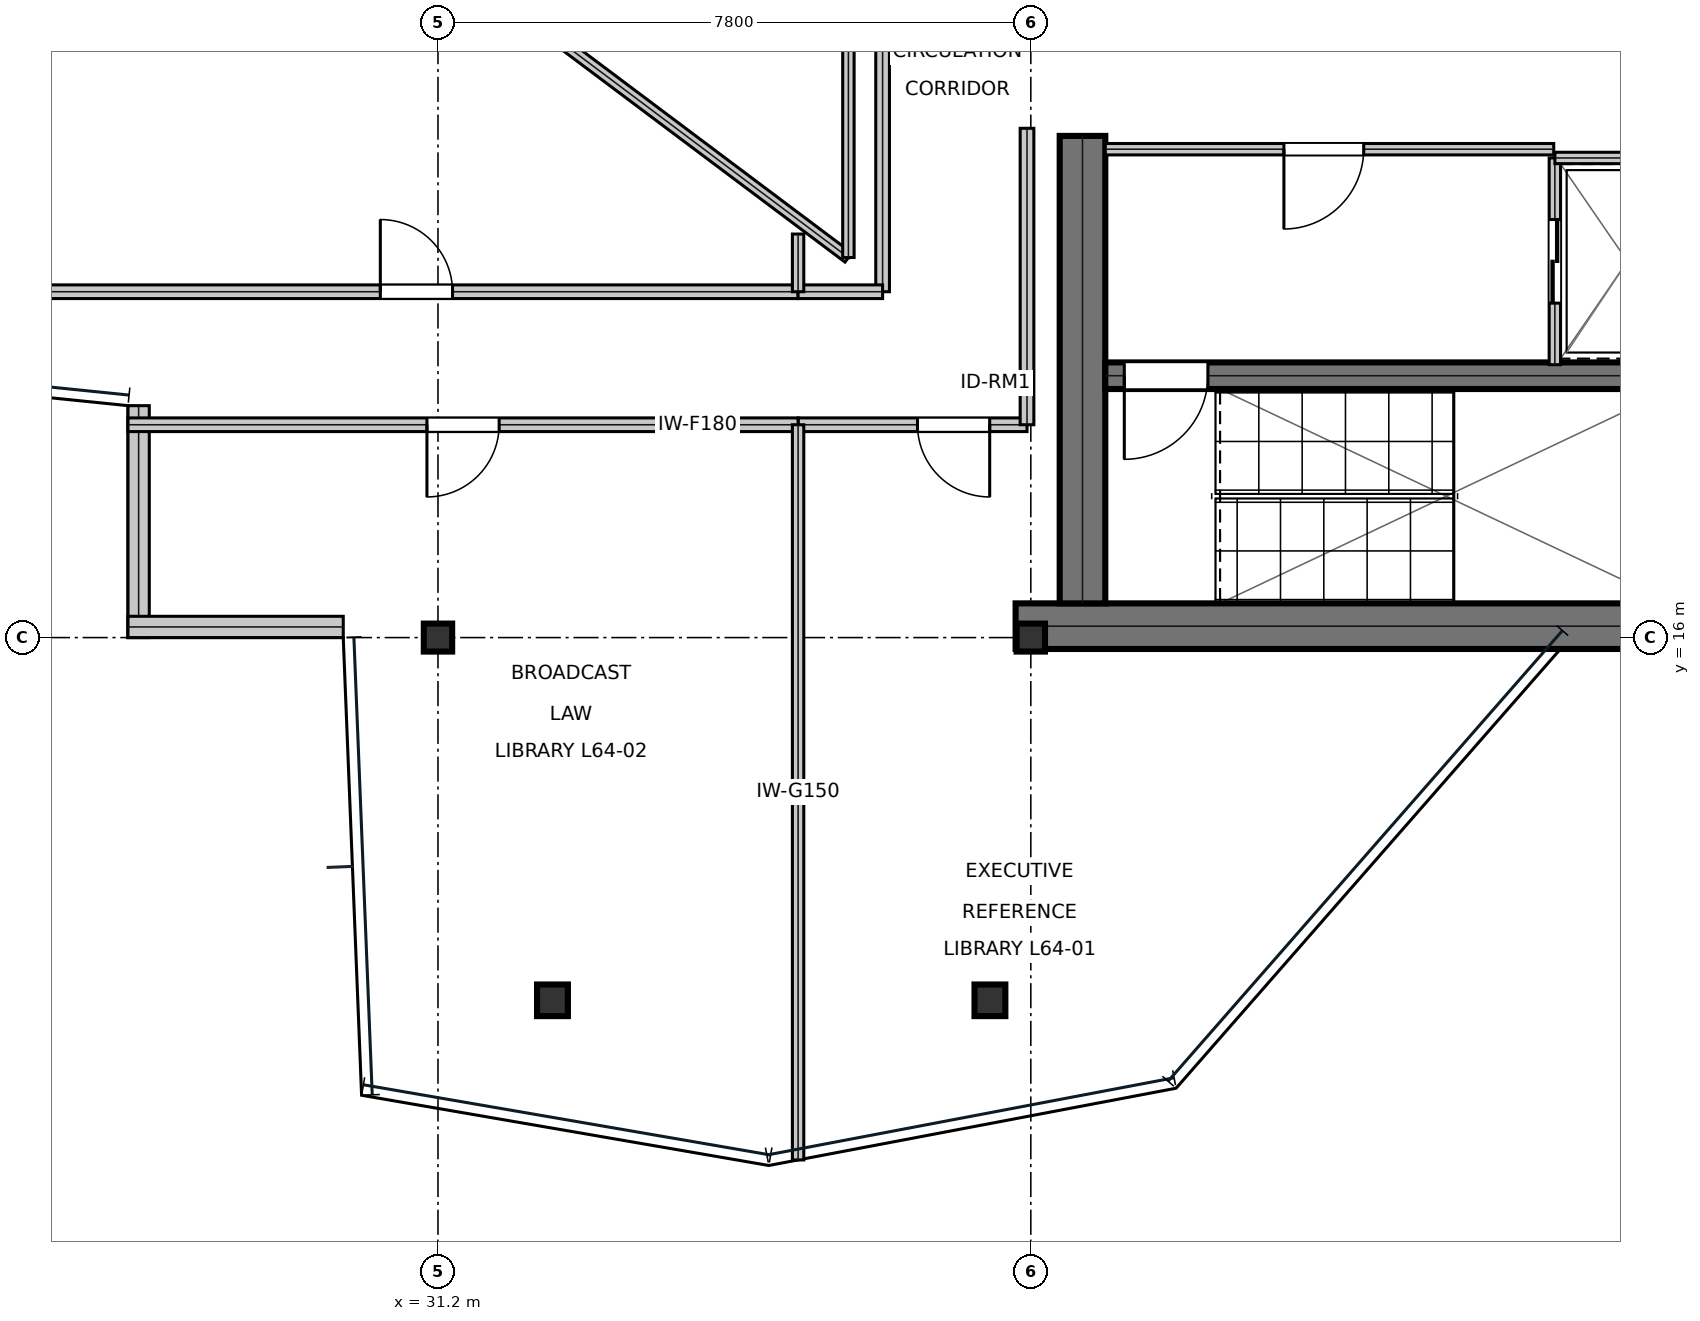
"""IFC4 building model, lengths in metres.
Left out: names, types, materials, properties, quantities, classifications, styles, units other than length and angle.
Written with IfcOpenShell. Run it as: python <this file> out.ifc"""

import sys

from ifc_helpers import new_model, si_unit, direction, frame, frame_2d, origin, origin_2d, place, context, subcontext, project, spatial, rectangle, i_section, extrude, element, fill, save


model = new_model("IFC4")
c1 = context("Model", 3, precision=1e-05, world=origin(), true_north=direction((0.0, 1.0)))
c2 = subcontext(c1, "Body", "Model", "MODEL_VIEW")
j1 = project(units=[si_unit("LENGTHUNIT", "METRE"), si_unit("PLANEANGLEUNIT", "RADIAN")], contexts=[c1])
p1 = place(None, origin())
s1 = spatial("IfcSite", under=j1, at=p1, CompositionType="ELEMENT")
p2 = place(p1, origin())
s2 = spatial("IfcBuilding", under=s1, at=p2, CompositionType="ELEMENT")
p3 = place(p2, frame((0.0, 0.0, 274.95)))
s3 = spatial("IfcBuildingStorey", under=s2, at=p3, CompositionType="ELEMENT", Elevation=274.95)
p4 = place(p3, frame((38.8, 16.15, 0.0), z_axis=(0.0, 0.0, 1.0), x_axis=(1.0, 0.0, 0.0)))
e1 = element("IfcWall", 1, at=p4, inside=s3, PredefinedType="SHEAR", context=c2, shape_type="SweptSolid", body=[
    extrude(rectangle(XDim=16.0, YDim=0.6, at=frame_2d((8.0, 0.0))), origin(), (0.0, 0.0, 1.0), 3.81),
])
p5 = place(p3, frame((39.68, 16.45, 0.0), z_axis=(0.0, 0.0, 1.0), x_axis=(0.0, 1.0, 0.0)))
e2 = element("IfcWall", 2, at=p5, inside=s3, PredefinedType="SHEAR", context=c2, shape_type="SweptSolid", body=[
    extrude(rectangle(XDim=6.15, YDim=0.6, at=frame_2d((3.075, 0.0))), origin(), (0.0, 0.0, 1.0), 3.81),
])
p6 = place(p3, frame((39.98, 19.445, 0.0), z_axis=(0.0, 0.0, 1.0), x_axis=(1.0, 0.0, 0.0)))
e3 = element("IfcWall", 3, at=p6, inside=s3, PredefinedType="SHEAR", context=c2, shape_type="SweptSolid", body=[
    extrude(rectangle(XDim=7.71, YDim=0.35, at=frame_2d((3.855, 0.0))), origin(), (0.0, 0.0, 1.0), 3.81),
])
p7 = place(p6, frame((0.25, 0.0, 0.0)))
e4 = element("IfcOpeningElement", 4, at=p7, cuts=e3, PredefinedType="OPENING", context=c2, shape_type="SweptSolid", body=[
    extrude(rectangle(XDim=1.1, YDim=2.15, at=frame_2d((0.55, 1.075))), frame((0.0, 0.185, 0.0), z_axis=(0.0, -1.0, 0.0), x_axis=(1.0, 0.0, 0.0)), (0.0, 0.0, 1.0), 0.37),
])
for number, where, z_axis, x_axis in (
    (5, (31.2, 16.0, 0.0), (0.0, 0.0, 1.0), (1.0, 0.0, 0.0)),
    (6, (39.0, 16.0, 0.0), (0.0, 0.0, 1.0), (1.0, 0.0, 0.0)),
):
    element("IfcColumn", number, at=place(p3, frame(where, z_axis=z_axis, x_axis=x_axis)), inside=s3, PredefinedType="COLUMN", context=c2, shape_type="SweptSolid", body=[
        extrude(i_section(OverallWidth=0.373, OverallDepth=0.368, WebThickness=0.015, FlangeThickness=0.024, at=origin_2d()), origin(), (0.0, 0.0, 1.0), 4.044),
    ])
p8 = place(p3, frame((32.706, 11.228, 0.016), z_axis=(0.013968236766, 0.029819148922, 0.999457706318), x_axis=(-0.905569653976, 0.424197597586, 0.0)))
e7 = element("IfcColumn", 7, at=p8, inside=s3, PredefinedType="COLUMN", context=c2, shape_type="SweptSolid", body=[
    extrude(i_section(OverallWidth=0.406, OverallDepth=0.416, WebThickness=0.03, FlangeThickness=0.048, at=origin_2d()), origin(), (0.0, 0.0, 1.0), 4.02),
])
p9 = place(p3, frame((38.462, 11.228, 0.016), z_axis=(-0.004980404192, 0.029821688517, 0.99954282673), x_axis=(-0.986339577116, -0.164724735893, 0.0)))
e8 = element("IfcColumn", 8, at=p9, inside=s3, PredefinedType="COLUMN", context=c2, shape_type="SweptSolid", body=[
    extrude(i_section(OverallWidth=0.406, OverallDepth=0.416, WebThickness=0.03, FlangeThickness=0.048, at=origin_2d()), origin(), (0.0, 0.0, 1.0), 4.02),
])
p10 = place(p3, frame((27.262, 19.051, 0.0), z_axis=(0.0, 0.0, 1.0), x_axis=(0.0, -1.0, 0.0)))
e9 = element("IfcWall", 9, at=p10, inside=s3, PredefinedType="STANDARD", context=c2, shape_type="SweptSolid", body=[
    extrude(rectangle(XDim=3.051, YDim=0.28, at=frame_2d((1.526, 0.0))), origin(), (0.0, 0.0, 1.0), 3.339),
])
p11 = place(p3, frame((27.122, 16.14, 0.0), z_axis=(0.0, 0.0, 1.0), x_axis=(1.0, 0.0, 0.0)))
e10 = element("IfcWall", 10, at=p11, inside=s3, PredefinedType="STANDARD", context=c2, shape_type="SweptSolid", body=[
    extrude(rectangle(XDim=2.832, YDim=0.28, at=frame_2d((1.416, 0.0))), origin(), (0.0, 0.0, 1.0), 3.81),
])
p12 = place(p3, frame((39.98, 22.425, 0.0), z_axis=(0.0, 0.0, 1.0), x_axis=(1.0, 0.0, 0.0)))
e11 = element("IfcWall", 11, at=p12, inside=s3, PredefinedType="PARTITIONING", context=c2, shape_type="SweptSolid", body=[
    extrude(rectangle(XDim=5.9, YDim=0.15, at=frame_2d((2.95, 0.0))), origin(), (0.0, 0.0, 1.0), 3.81),
])
p13 = place(p12, frame((2.35, 0.0, 0.0)))
e12 = element("IfcOpeningElement", 12, at=p13, cuts=e11, PredefinedType="OPENING", context=c2, shape_type="SweptSolid", body=[
    extrude(rectangle(XDim=1.05, YDim=2.15, at=frame_2d((0.525, 1.075))), frame((0.0, 0.085, 0.0), z_axis=(0.0, -1.0, 0.0), x_axis=(1.0, 0.0, 0.0)), (0.0, 0.0, 1.0), 0.17),
])
p14 = place(p3, frame((45.895, 19.59, 0.0), z_axis=(0.0, 0.0, 1.0), x_axis=(0.0, 1.0, 0.0)))
e13 = element("IfcWall", 13, at=p14, inside=s3, PredefinedType="PARTITIONING", context=c2, shape_type="SweptSolid", body=[
    extrude(rectangle(XDim=2.72, YDim=0.15, at=frame_2d((1.36, 0.0))), origin(), (0.0, 0.0, 1.0), 3.81),
])
p15 = place(p14, frame((0.81, 0.0, 0.0)))
e14 = element("IfcOpeningElement", 14, at=p15, cuts=e13, PredefinedType="OPENING", context=c2, shape_type="SweptSolid", body=[
    extrude(rectangle(XDim=1.1, YDim=2.15, at=frame_2d((0.55, 1.075))), frame((0.0, 0.085, 0.0), z_axis=(0.0, -1.0, 0.0), x_axis=(1.0, 0.0, 0.0)), (0.0, 0.0, 1.0), 0.17),
])
p16 = place(p3, frame((45.895, 22.31, 0.0), z_axis=(0.0, 0.0, 1.0), x_axis=(1.0, 0.0, 0.0)))
e15 = element("IfcWall", 15, at=p16, inside=s3, PredefinedType="PARTITIONING", context=c2, shape_type="SweptSolid", body=[
    extrude(rectangle(XDim=1.915, YDim=0.15, at=frame_2d((0.958, 0.0))), origin(), (0.0, 0.0, 1.0), 3.81),
])
p17 = place(p3, frame((35.938, 18.8, 0.0), z_axis=(0.0, 0.0, 1.0), x_axis=(1.0, 0.0, 0.0)))
e16 = element("IfcWall", 16, at=p17, inside=s3, PredefinedType="SOLIDWALL", context=c2, shape_type="SweptSolid", body=[
    extrude(rectangle(XDim=3.012, YDim=0.18, at=frame_2d((1.506, 0.0))), origin(), (0.0, 0.0, 1.0), 3.81),
])
p18 = place(p17, frame((1.571, 0.0, 0.0)))
e17 = element("IfcOpeningElement", 17, at=p18, cuts=e16, PredefinedType="OPENING", context=c2, shape_type="SweptSolid", body=[
    extrude(rectangle(XDim=0.95, YDim=2.15, at=frame_2d((0.475, 1.075))), frame((0.0, 0.1, 0.0), z_axis=(0.0, -1.0, 0.0), x_axis=(1.0, 0.0, 0.0)), (0.0, 0.0, 1.0), 0.2),
])
p19 = place(p3, frame((27.122, 18.8, 0.0), z_axis=(0.0, 0.0, 1.0), x_axis=(1.0, 0.0, 0.0)))
e18 = element("IfcWall", 18, at=p19, inside=s3, PredefinedType="SOLIDWALL", context=c2, shape_type="SweptSolid", body=[
    extrude(rectangle(XDim=8.816, YDim=0.18, at=frame_2d((4.408, 0.0))), origin(), (0.0, 0.0, 1.0), 3.27),
])
p20 = place(p19, frame((3.933, 0.0, 0.0)))
e19 = element("IfcOpeningElement", 19, at=p20, cuts=e18, PredefinedType="OPENING", context=c2, shape_type="SweptSolid", body=[
    extrude(rectangle(XDim=0.95, YDim=2.15, at=frame_2d((0.475, 1.075))), frame((0.0, 0.1, 0.0), z_axis=(0.0, -1.0, 0.0), x_axis=(1.0, 0.0, 0.0)), (0.0, 0.0, 1.0), 0.2),
])
p21 = place(p3, frame((25.895, 20.55, 0.0), z_axis=(0.0, 0.0, 1.0), x_axis=(1.0, 0.0, 0.0)))
e20 = element("IfcWall", 20, at=p21, inside=s3, PredefinedType="SOLIDWALL", context=c2, shape_type="SweptSolid", body=[
    extrude(rectangle(XDim=10.043, YDim=0.18, at=frame_2d((5.021, 0.0))), origin(), (0.0, 0.0, 1.0), 3.27),
])
p22 = place(p21, frame((4.546, 0.0, 0.0)))
e21 = element("IfcOpeningElement", 21, at=p22, cuts=e20, PredefinedType="OPENING", context=c2, shape_type="SweptSolid", body=[
    extrude(rectangle(XDim=0.95, YDim=2.15, at=frame_2d((0.475, 1.075))), frame((0.0, 0.1, 0.0), z_axis=(0.0, -1.0, 0.0), x_axis=(1.0, 0.0, 0.0)), (0.0, 0.0, 1.0), 0.2),
])
p23 = place(p3, frame((38.95, 18.8, 0.0), z_axis=(0.0, 0.0, 1.0), x_axis=(0.0, 1.0, 0.0)))
e22 = element("IfcWall", 22, at=p23, inside=s3, PredefinedType="SOLIDWALL", context=c2, shape_type="SweptSolid", body=[
    extrude(rectangle(XDim=3.9, YDim=0.18, at=frame_2d((1.95, 0.0))), origin(), (0.0, 0.0, 1.0), 3.54),
])
p24 = place(p3, frame((37.05, 20.55, 0.0), z_axis=(0.0, 0.0, 1.0), x_axis=(0.0, 1.0, 0.0)))
e23 = element("IfcWall", 23, at=p24, inside=s3, PredefinedType="SOLIDWALL", context=c2, shape_type="SweptSolid", body=[
    extrude(rectangle(XDim=8.25, YDim=0.18, at=frame_2d((4.125, 0.0))), origin(), (0.0, 0.0, 1.0), 3.54),
])
p25 = place(p3, frame((35.938, 20.55, 0.0), z_axis=(0.0, 0.0, 1.0), x_axis=(1.0, 0.0, 0.0)))
e24 = element("IfcWall", 24, at=p25, inside=s3, PredefinedType="SOLIDWALL", context=c2, shape_type="SweptSolid", body=[
    extrude(rectangle(XDim=1.112, YDim=0.18, at=frame_2d((0.556, 0.0))), origin(), (0.0, 0.0, 1.0), 3.54),
])
p26 = place(p3, frame((35.938, 9.128, 0.0), z_axis=(0.0, 0.0, 1.0), x_axis=(0.0, 1.0, 0.0)))
e25 = element("IfcWall", 25, at=p26, inside=s3, PredefinedType="MOVABLE", context=c2, shape_type="SweptSolid", body=[
    extrude(rectangle(XDim=9.672, YDim=0.15, at=frame_2d((4.836, 0.0))), origin(), (0.0, 0.0, 1.0), 3.27),
])
p27 = place(p3, frame((35.938, 20.55, 0.0), z_axis=(0.0, 0.0, 1.0), x_axis=(0.0, 1.0, 0.0)))
e26 = element("IfcWall", 26, at=p27, inside=s3, PredefinedType="MOVABLE", context=c2, shape_type="SweptSolid", body=[
    extrude(rectangle(XDim=0.759, YDim=0.15, at=frame_2d((0.379, 0.0))), origin(), (0.0, 0.0, 1.0), 3.81),
])
p28 = place(p3, frame((32.6, 24.0, 0.0), z_axis=(0.0, 0.0, 1.0), x_axis=(0.8, -0.6, 0.0)))
e27 = element("IfcWall", 27, at=p28, inside=s3, PredefinedType="MOVABLE", context=c2, shape_type="SweptSolid", body=[
    extrude(rectangle(XDim=5.0, YDim=0.15, at=frame_2d((2.5, 0.0))), origin(), (0.0, 0.0, 1.0), 3.81),
])
p29 = place(p3, frame((36.6, 21.0, 0.0), z_axis=(0.0, 0.0, 1.0), x_axis=(0.0, 1.0, 0.0)))
e28 = element("IfcWall", 28, at=p29, inside=s3, PredefinedType="MOVABLE", context=c2, shape_type="SweptSolid", body=[
    extrude(rectangle(XDim=6.0, YDim=0.15, at=frame_2d((3.0, 0.0))), origin(), (0.0, 0.0, 1.0), 3.81),
])
p30 = place(p13, frame((1.05, 0.0, 0.0), z_axis=(0.0, 0.0, 1.0), x_axis=(-1.0, 0.0, 0.0)))
e29 = element("IfcDoor", 29, at=p30, inside=s3, OperationType="SINGLE_SWING_RIGHT", PredefinedType="DOOR", context=c2, shape_type="SweptSolid", body=[
    extrude(rectangle(XDim=1.05, YDim=2.15, at=frame_2d((0.525, 1.075))), frame((0.0, 0.025, 0.0), z_axis=(0.0, -1.0, 0.0), x_axis=(1.0, 0.0, 0.0)), (0.0, 0.0, 1.0), 0.05),
])
fill(e12, e29)
p31 = place(p15, frame((1.1, 0.0, 0.0), z_axis=(0.0, 0.0, 1.0), x_axis=(-1.0, 0.0, 0.0)))
e30 = element("IfcDoor", 30, at=p31, inside=s3, OperationType="DOUBLE_DOOR_SLIDING", PredefinedType="DOOR", context=c2, shape_type="SweptSolid", body=[
    extrude(rectangle(XDim=1.1, YDim=2.15, at=frame_2d((0.55, 1.075))), frame((0.0, 0.025, 0.0), z_axis=(0.0, -1.0, 0.0), x_axis=(1.0, 0.0, 0.0)), (0.0, 0.0, 1.0), 0.05),
])
fill(e14, e30)
p32 = place(p18, frame((0.95, 0.0, 0.0), z_axis=(0.0, 0.0, 1.0), x_axis=(-1.0, 0.0, 0.0)))
e31 = element("IfcDoor", 31, at=p32, inside=s3, OperationType="SINGLE_SWING_LEFT", PredefinedType="DOOR", context=c2, shape_type="SweptSolid", body=[
    extrude(rectangle(XDim=0.95, YDim=2.15, at=frame_2d((0.475, 1.075))), frame((0.0, 0.025, 0.0), z_axis=(0.0, -1.0, 0.0), x_axis=(1.0, 0.0, 0.0)), (0.0, 0.0, 1.0), 0.05),
])
fill(e17, e31)
p33 = place(p20, frame((0.95, 0.0, 0.0), z_axis=(0.0, 0.0, 1.0), x_axis=(-1.0, 0.0, 0.0)))
e32 = element("IfcDoor", 32, at=p33, inside=s3, OperationType="SINGLE_SWING_RIGHT", PredefinedType="DOOR", context=c2, shape_type="SweptSolid", body=[
    extrude(rectangle(XDim=0.95, YDim=2.15, at=frame_2d((0.475, 1.075))), frame((0.0, 0.025, 0.0), z_axis=(0.0, -1.0, 0.0), x_axis=(1.0, 0.0, 0.0)), (0.0, 0.0, 1.0), 0.05),
])
fill(e19, e32)
p34 = place(p22, origin())
e33 = element("IfcDoor", 33, at=p34, inside=s3, OperationType="SINGLE_SWING_LEFT", PredefinedType="DOOR", context=c2, shape_type="SweptSolid", body=[
    extrude(rectangle(XDim=0.95, YDim=2.15, at=frame_2d((0.475, 1.075))), frame((0.0, 0.025, 0.0), z_axis=(0.0, -1.0, 0.0), x_axis=(1.0, 0.0, 0.0)), (0.0, 0.0, 1.0), 0.05),
])
fill(e21, e33)
p35 = place(p7, frame((1.1, 0.0, 0.0), z_axis=(0.0, 0.0, 1.0), x_axis=(-1.0, 0.0, 0.0)))
e34 = element("IfcDoor", 34, at=p35, inside=s3, OperationType="SINGLE_SWING_RIGHT", PredefinedType="DOOR", context=c2, shape_type="SweptSolid", body=[
    extrude(rectangle(XDim=1.1, YDim=2.15, at=frame_2d((0.55, 1.075))), frame((0.0, 0.025, 0.0), z_axis=(0.0, -1.0, 0.0), x_axis=(1.0, 0.0, 0.0)), (0.0, 0.0, 1.0), 0.05),
])
fill(e4, e34)
save(model, sys.argv[1])
